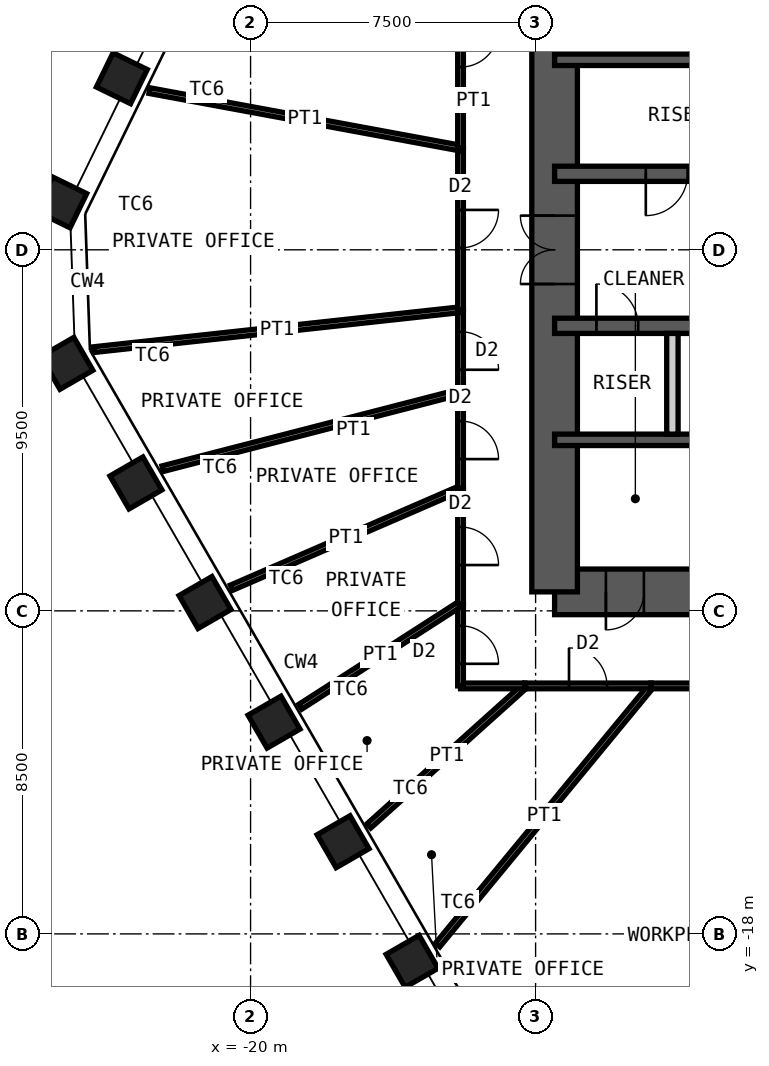
"""IFC4 building model, lengths in metres.
Left out: names, types, materials, properties, quantities, classifications, styles, units other than length and angle.
Written with IfcOpenShell. Run it as: python <this file> out.ifc"""

import sys

from ifc_helpers import new_model, si_unit, direction, frame, frame_2d, origin, origin_2d, place, context, subcontext, project, spatial, rectangle, hollow_rectangle, extrude, element, fill, save


model = new_model("IFC4")
c1 = context("Model", 3, precision=1e-05, world=origin(), true_north=direction((0.0, 1.0)))
c2 = subcontext(c1, "Body", "Model", "MODEL_VIEW")
j1 = project(units=[si_unit("LENGTHUNIT", "METRE"), si_unit("PLANEANGLEUNIT", "RADIAN")], contexts=[c1])
p1 = place(None, origin())
s1 = spatial("IfcSite", under=j1, at=p1, CompositionType="ELEMENT")
p2 = place(p1, origin())
s2 = spatial("IfcBuilding", under=s1, at=p2, CompositionType="ELEMENT")
p3 = place(p2, frame((0.0, 0.0, 243.4)))
s3 = spatial("IfcBuildingStorey", under=s2, at=p3, CompositionType="ELEMENT", Elevation=243.4)
for number, where, z_axis, x_axis in (
    (1, (-15.749, -18.721, 0.0), (0.0, 0.0, 1.0), (0.5, -0.866, 0.0)),
    (2, (-17.566, -15.574, 0.0), (0.0, 0.0, 1.0), (0.5, -0.866, 0.0)),
    (3, (-19.383, -12.428, 0.0), (0.0, 0.0, 1.0), (0.5, -0.866, 0.0)),
    (4, (-21.2, -9.281, 0.0), (0.0, 0.0, 1.0), (0.5, -0.866, 0.0)),
    (5, (-23.016, -6.134, 0.0), (0.0, 0.0, 1.0), (0.5, -0.866, 0.0)),
    (6, (-24.833, -2.988, 0.0), (0.0, 0.0, 1.0), (0.5, -0.866, 0.0)),
    (7, (-24.981, 1.248, 0.0), (0.0, 0.0, 1.0), (-0.438, -0.899, 0.0)),
    (8, (-23.388, 4.514, 0.0), (0.0, 0.0, 1.0), (-0.438, -0.899, 0.0)),
):
    element("IfcColumn", number, at=place(p3, frame(where, z_axis=z_axis, x_axis=x_axis)), inside=s3, PredefinedType="COLUMN", context=c2, shape_type="SweptSolid", body=[
        extrude(hollow_rectangle(XDim=1.0, YDim=1.0, WallThickness=0.06, at=origin_2d()), origin(), (0.0, 0.0, 1.0), 4.2),
    ])
p4 = place(p3, frame((-12.0, -9.0, 0.0), z_axis=(0.0, 0.0, 1.0), x_axis=(1.0, 0.0, 0.0)))
e9 = element("IfcWall", 9, at=p4, inside=s3, PredefinedType="SHEAR", context=c2, shape_type="SweptSolid", body=[
    extrude(rectangle(XDim=24.0, YDim=1.2, at=frame_2d((12.0, 0.0))), origin(), (0.0, 0.0, 1.0), 4.2),
])
p5 = place(p4, frame((1.35, 0.0, 0.0)))
e10 = element("IfcOpeningElement", 10, at=p5, cuts=e9, PredefinedType="OPENING", context=c2, shape_type="SweptSolid", body=[
    extrude(rectangle(XDim=1.0, YDim=2.1, at=frame_2d((0.5, 1.05))), frame((0.0, 0.61, 0.0), z_axis=(0.0, -1.0, 0.0), x_axis=(1.0, 0.0, 0.0)), (0.0, 0.0, 1.0), 1.22),
])
p6 = place(p4, frame((5.325, 0.0, 0.0)))
e11 = element("IfcOpeningElement", 11, at=p6, cuts=e9, PredefinedType="OPENING", context=c2, shape_type="SweptSolid", body=[
    extrude(rectangle(XDim=1.15, YDim=2.1, at=frame_2d((0.575, 1.05))), frame((0.0, 0.61, 0.0), z_axis=(0.0, -1.0, 0.0), x_axis=(1.0, 0.0, 0.0)), (0.0, 0.0, 1.0), 1.22),
])
p7 = place(p4, frame((12.6, 0.0, 0.0)))
e12 = element("IfcOpeningElement", 12, at=p7, cuts=e9, PredefinedType="OPENING", context=c2, shape_type="SweptSolid", body=[
    extrude(rectangle(XDim=1.0, YDim=2.1, at=frame_2d((0.5, 1.05))), frame((0.0, 0.61, 0.0), z_axis=(0.0, -1.0, 0.0), x_axis=(1.0, 0.0, 0.0)), (0.0, 0.0, 1.0), 1.22),
])
p8 = place(p3, frame((-12.0, -9.0, 0.0), z_axis=(0.0, 0.0, 1.0), x_axis=(0.0, 1.0, 0.0)))
e13 = element("IfcWall", 13, at=p8, inside=s3, PredefinedType="SHEAR", context=c2, shape_type="SweptSolid", body=[
    extrude(rectangle(XDim=18.0, YDim=1.2, at=frame_2d((9.0, 0.0))), origin(), (0.0, 0.0, 1.0), 4.2),
])
p9 = place(p8, frame((8.1, 0.0, 0.0)))
e14 = element("IfcOpeningElement", 14, at=p9, cuts=e13, PredefinedType="OPENING", context=c2, shape_type="SweptSolid", body=[
    extrude(rectangle(XDim=1.8, YDim=2.1, at=frame_2d((0.9, 1.05))), frame((0.0, 0.61, 0.0), z_axis=(0.0, -1.0, 0.0), x_axis=(1.0, 0.0, 0.0)), (0.0, 0.0, 1.0), 1.22),
])
p10 = place(p3, frame((-12.0, 5.0, 0.0), z_axis=(0.0, 0.0, 1.0), x_axis=(1.0, 0.0, 0.0)))
e15 = element("IfcWall", 15, at=p10, inside=s3, PredefinedType="SHEAR", context=c2, shape_type="SweptSolid", body=[
    extrude(rectangle(XDim=24.0, YDim=0.3, at=frame_2d((12.0, 0.0))), origin(), (0.0, 0.0, 1.0), 4.2),
])
p11 = place(p3, frame((-12.0, 2.0, 0.0), z_axis=(0.0, 0.0, 1.0), x_axis=(1.0, 0.0, 0.0)))
e16 = element("IfcWall", 16, at=p11, inside=s3, PredefinedType="SHEAR", context=c2, shape_type="SweptSolid", body=[
    extrude(rectangle(XDim=24.0, YDim=0.4, at=frame_2d((12.0, 0.0))), origin(), (0.0, 0.0, 1.0), 4.2),
])
p12 = place(p11, frame((2.4, 0.0, 0.0)))
e17 = element("IfcOpeningElement", 17, at=p12, cuts=e16, PredefinedType="OPENING", context=c2, shape_type="SweptSolid", body=[
    extrude(rectangle(XDim=1.1, YDim=2.1, at=frame_2d((0.55, 1.05))), frame((0.0, 0.21, 0.0), z_axis=(0.0, -1.0, 0.0), x_axis=(1.0, 0.0, 0.0)), (0.0, 0.0, 1.0), 0.42),
])
p13 = place(p11, frame((22.0, 0.0, 0.0)))
e18 = element("IfcOpeningElement", 18, at=p13, cuts=e16, PredefinedType="OPENING", context=c2, shape_type="SweptSolid", body=[
    extrude(rectangle(XDim=1.1, YDim=2.1, at=frame_2d((0.55, 1.05))), frame((0.0, 0.21, 0.0), z_axis=(0.0, -1.0, 0.0), x_axis=(1.0, 0.0, 0.0)), (0.0, 0.0, 1.0), 0.42),
])
p14 = place(p11, frame((10.15, 0.0, 0.0)))
e19 = element("IfcOpeningElement", 19, at=p14, cuts=e16, PredefinedType="OPENING", context=c2, shape_type="SweptSolid", body=[
    extrude(rectangle(XDim=1.0, YDim=2.1, at=frame_2d((0.5, 1.05))), frame((0.0, 0.21, 0.0), z_axis=(0.0, -1.0, 0.0), x_axis=(1.0, 0.0, 0.0)), (0.0, 0.0, 1.0), 0.42),
])
p15 = place(p11, frame((6.9, 0.0, 0.0)))
e20 = element("IfcOpeningElement", 20, at=p15, cuts=e16, PredefinedType="OPENING", context=c2, shape_type="SweptSolid", body=[
    extrude(rectangle(XDim=1.0, YDim=2.1, at=frame_2d((0.5, 1.05))), frame((0.0, 0.21, 0.0), z_axis=(0.0, -1.0, 0.0), x_axis=(1.0, 0.0, 0.0)), (0.0, 0.0, 1.0), 0.42),
])
p16 = place(p11, frame((13.35, 0.0, 0.0)))
e21 = element("IfcOpeningElement", 21, at=p16, cuts=e16, PredefinedType="OPENING", context=c2, shape_type="SweptSolid", body=[
    extrude(rectangle(XDim=1.1, YDim=2.4, at=frame_2d((0.55, 1.2))), frame((0.0, 0.21, 0.0), z_axis=(0.0, -1.0, 0.0), x_axis=(1.0, 0.0, 0.0)), (0.0, 0.0, 1.0), 0.42),
])
p17 = place(p11, frame((16.15, 0.0, 0.0)))
e22 = element("IfcOpeningElement", 22, at=p17, cuts=e16, PredefinedType="OPENING", context=c2, shape_type="SweptSolid", body=[
    extrude(rectangle(XDim=1.1, YDim=2.4, at=frame_2d((0.55, 1.2))), frame((0.0, 0.21, 0.0), z_axis=(0.0, -1.0, 0.0), x_axis=(1.0, 0.0, 0.0)), (0.0, 0.0, 1.0), 0.42),
])
p18 = place(p11, frame((18.95, 0.0, 0.0)))
e23 = element("IfcOpeningElement", 23, at=p18, cuts=e16, PredefinedType="OPENING", context=c2, shape_type="SweptSolid", body=[
    extrude(rectangle(XDim=1.1, YDim=2.4, at=frame_2d((0.55, 1.2))), frame((0.0, 0.21, 0.0), z_axis=(0.0, -1.0, 0.0), x_axis=(1.0, 0.0, 0.0)), (0.0, 0.0, 1.0), 0.42),
])
p19 = place(p3, frame((-12.0, -2.0, 0.0), z_axis=(0.0, 0.0, 1.0), x_axis=(1.0, 0.0, 0.0)))
e24 = element("IfcWall", 24, at=p19, inside=s3, PredefinedType="SHEAR", context=c2, shape_type="SweptSolid", body=[
    extrude(rectangle(XDim=24.0, YDim=0.4, at=frame_2d((12.0, 0.0))), origin(), (0.0, 0.0, 1.0), 4.2),
])
p20 = place(p19, frame((1.1, 0.0, 0.0)))
e25 = element("IfcOpeningElement", 25, at=p20, cuts=e24, PredefinedType="OPENING", context=c2, shape_type="SweptSolid", body=[
    extrude(rectangle(XDim=1.1, YDim=2.1, at=frame_2d((0.55, 1.05))), frame((0.0, 0.21, 0.0), z_axis=(0.0, -1.0, 0.0), x_axis=(1.0, 0.0, 0.0)), (0.0, 0.0, 1.0), 0.42),
])
p21 = place(p19, frame((13.55, 0.0, 0.0)))
e26 = element("IfcOpeningElement", 26, at=p21, cuts=e24, PredefinedType="OPENING", context=c2, shape_type="SweptSolid", body=[
    extrude(rectangle(XDim=1.1, YDim=2.1, at=frame_2d((0.55, 1.05))), frame((0.0, 0.21, 0.0), z_axis=(0.0, -1.0, 0.0), x_axis=(1.0, 0.0, 0.0)), (0.0, 0.0, 1.0), 0.42),
])
p22 = place(p19, frame((20.7, 0.0, 0.0)))
e27 = element("IfcOpeningElement", 27, at=p22, cuts=e24, PredefinedType="OPENING", context=c2, shape_type="SweptSolid", body=[
    extrude(rectangle(XDim=1.1, YDim=2.1, at=frame_2d((0.55, 1.05))), frame((0.0, 0.21, 0.0), z_axis=(0.0, -1.0, 0.0), x_axis=(1.0, 0.0, 0.0)), (0.0, 0.0, 1.0), 0.42),
])
p23 = place(p19, frame((4.0, 0.0, 0.0)))
e28 = element("IfcOpeningElement", 28, at=p23, cuts=e24, PredefinedType="OPENING", context=c2, shape_type="SweptSolid", body=[
    extrude(rectangle(XDim=1.0, YDim=2.1, at=frame_2d((0.5, 1.05))), frame((0.0, 0.21, 0.0), z_axis=(0.0, -1.0, 0.0), x_axis=(1.0, 0.0, 0.0)), (0.0, 0.0, 1.0), 0.42),
])
p24 = place(p19, frame((6.8, 0.0, 0.0)))
e29 = element("IfcOpeningElement", 29, at=p24, cuts=e24, PredefinedType="OPENING", context=c2, shape_type="SweptSolid", body=[
    extrude(rectangle(XDim=1.0, YDim=2.1, at=frame_2d((0.5, 1.05))), frame((0.0, 0.21, 0.0), z_axis=(0.0, -1.0, 0.0), x_axis=(1.0, 0.0, 0.0)), (0.0, 0.0, 1.0), 0.42),
])
p25 = place(p3, frame((-12.0, -5.0, 0.0), z_axis=(0.0, 0.0, 1.0), x_axis=(1.0, 0.0, 0.0)))
e30 = element("IfcWall", 30, at=p25, inside=s3, PredefinedType="SHEAR", context=c2, shape_type="SweptSolid", body=[
    extrude(rectangle(XDim=24.0, YDim=0.3, at=frame_2d((12.0, 0.0))), origin(), (0.0, 0.0, 1.0), 4.2),
])
p26 = place(p3, frame((-8.9, -4.85, 0.0), z_axis=(0.0, 0.0, 1.0), x_axis=(0.0, 1.0, 0.0)))
e31 = element("IfcWall", 31, at=p26, inside=s3, PredefinedType="PARTITIONING", context=c2, shape_type="SweptSolid", body=[
    extrude(rectangle(XDim=2.65, YDim=0.3, at=frame_2d((1.325, 0.0))), origin(), (0.0, 0.0, 1.0), 3.98),
])
p27 = place(p3, frame((-15.08, -18.294, 0.0), z_axis=(0.0, 0.0, 1.0), x_axis=(0.636052894953, 0.771645459277, 0.0)))
e32 = element("IfcWall", 32, at=p27, inside=s3, PredefinedType="PARTITIONING", context=c2, shape_type="SweptSolid", body=[
    extrude(rectangle(XDim=8.837, YDim=0.15, at=frame_2d((4.418, 0.0))), origin(), (0.0, 0.0, 1.0), 3.43),
])
p28 = place(p3, frame((-9.459, -11.475, 0.0), z_axis=(0.0, 0.0, 1.0), x_axis=(-1.0, 0.0, 0.0)))
e33 = element("IfcWall", 33, at=p28, inside=s3, PredefinedType="PARTITIONING", context=c2, shape_type="SweptSolid", body=[
    extrude(rectangle(XDim=3.324, YDim=0.15, at=frame_2d((1.662, 0.0))), origin(), (0.0, 0.0, 1.0), 4.03),
])
p29 = place(p28, frame((1.162, 0.0, 0.0)))
e34 = element("IfcOpeningElement", 34, at=p29, cuts=e33, PredefinedType="OPENING", context=c2, shape_type="SweptSolid", body=[
    extrude(rectangle(XDim=1.0, YDim=2.4, at=frame_2d((0.5, 1.2))), frame((0.0, 0.085, 0.0), z_axis=(0.0, -1.0, 0.0), x_axis=(1.0, 0.0, 0.0)), (0.0, 0.0, 1.0), 0.17),
])
p30 = place(p3, frame((-16.885, -15.158, 0.0), z_axis=(0.0, 0.0, 1.0), x_axis=(0.744165513773, 0.667995275515, 0.0)))
e35 = element("IfcWall", 35, at=p30, inside=s3, PredefinedType="PARTITIONING", context=c2, shape_type="SweptSolid", body=[
    extrude(rectangle(XDim=5.513, YDim=0.15, at=frame_2d((2.756, 0.0))), origin(), (0.0, 0.0, 1.0), 3.43),
])
p31 = place(p3, frame((-12.783, -11.475, 0.0), z_axis=(0.0, 0.0, 1.0), x_axis=(-1.0, 0.0, 0.0)))
e36 = element("IfcWall", 36, at=p31, inside=s3, PredefinedType="PARTITIONING", context=c2, shape_type="SweptSolid", body=[
    extrude(rectangle(XDim=1.692, YDim=0.15, at=frame_2d((0.846, 0.0))), origin(), (0.0, 0.0, 1.0), 4.03),
])
p32 = place(p3, frame((-14.475, -11.475, 0.0), z_axis=(0.0, 0.0, 1.0), x_axis=(0.0, 1.0, 0.0)))
e37 = element("IfcWall", 37, at=p32, inside=s3, PredefinedType="PARTITIONING", context=c2, shape_type="SweptSolid", body=[
    extrude(rectangle(XDim=2.164, YDim=0.15, at=frame_2d((1.082, 0.0))), origin(), (0.0, 0.0, 1.0), 4.03),
])
p33 = place(p32, frame((0.582, 0.0, 0.0)))
e38 = element("IfcOpeningElement", 38, at=p33, cuts=e37, PredefinedType="OPENING", context=c2, shape_type="SweptSolid", body=[
    extrude(rectangle(XDim=1.0, YDim=2.4, at=frame_2d((0.5, 1.2))), frame((0.0, 0.085, 0.0), z_axis=(0.0, -1.0, 0.0), x_axis=(1.0, 0.0, 0.0)), (0.0, 0.0, 1.0), 0.17),
])
p34 = place(p3, frame((-18.693, -12.024, 0.0), z_axis=(0.0, 0.0, 1.0), x_axis=(0.841031335058, 0.540986407824, 0.0)))
e39 = element("IfcWall", 39, at=p34, inside=s3, PredefinedType="PARTITIONING", context=c2, shape_type="SweptSolid", body=[
    extrude(rectangle(XDim=5.015, YDim=0.15, at=frame_2d((2.507, 0.0))), origin(), (0.0, 0.0, 1.0), 3.43),
])
p35 = place(p3, frame((-14.475, -9.311, 0.0), z_axis=(0.0, 0.0, 1.0), x_axis=(0.0, 1.0, 0.0)))
e40 = element("IfcWall", 40, at=p35, inside=s3, PredefinedType="PARTITIONING", context=c2, shape_type="SweptSolid", body=[
    extrude(rectangle(XDim=3.033, YDim=0.15, at=frame_2d((1.517, 0.0))), origin(), (0.0, 0.0, 1.0), 4.03),
])
p36 = place(p35, frame((1.017, 0.0, 0.0)))
e41 = element("IfcOpeningElement", 41, at=p36, cuts=e40, PredefinedType="OPENING", context=c2, shape_type="SweptSolid", body=[
    extrude(rectangle(XDim=1.0, YDim=2.4, at=frame_2d((0.5, 1.2))), frame((0.0, 0.085, 0.0), z_axis=(0.0, -1.0, 0.0), x_axis=(1.0, 0.0, 0.0)), (0.0, 0.0, 1.0), 0.17),
])
p37 = place(p3, frame((-20.502, -8.891, 0.0), z_axis=(0.0, 0.0, 1.0), x_axis=(0.917431289744, 0.397894242982, 0.0)))
e42 = element("IfcWall", 42, at=p37, inside=s3, PredefinedType="PARTITIONING", context=c2, shape_type="SweptSolid", body=[
    extrude(rectangle(XDim=6.569, YDim=0.15, at=frame_2d((3.285, 0.0))), origin(), (0.0, 0.0, 1.0), 3.43),
])
p38 = place(p3, frame((-14.475, -6.278, 0.0), z_axis=(0.0, 0.0, 1.0), x_axis=(0.0, 1.0, 0.0)))
e43 = element("IfcWall", 43, at=p38, inside=s3, PredefinedType="PARTITIONING", context=c2, shape_type="SweptSolid", body=[
    extrude(rectangle(XDim=2.542, YDim=0.15, at=frame_2d((1.271, 0.0))), origin(), (0.0, 0.0, 1.0), 4.03),
])
p39 = place(p38, frame((0.771, 0.0, 0.0)))
e44 = element("IfcOpeningElement", 44, at=p39, cuts=e43, PredefinedType="OPENING", context=c2, shape_type="SweptSolid", body=[
    extrude(rectangle(XDim=1.0, YDim=2.4, at=frame_2d((0.5, 1.2))), frame((0.0, 0.085, 0.0), z_axis=(0.0, -1.0, 0.0), x_axis=(1.0, 0.0, 0.0)), (0.0, 0.0, 1.0), 0.17),
])
p40 = place(p3, frame((-22.313, -5.759, 0.0), z_axis=(0.0, 0.0, 1.0), x_axis=(0.968265788926, 0.249922712042, 0.0)))
e45 = element("IfcWall", 45, at=p40, inside=s3, PredefinedType="PARTITIONING", context=c2, shape_type="SweptSolid", body=[
    extrude(rectangle(XDim=8.095, YDim=0.15, at=frame_2d((4.048, 0.0))), origin(), (0.0, 0.0, 1.0), 3.43),
])
p41 = place(p3, frame((-14.475, -3.736, 0.0), z_axis=(0.0, 0.0, 1.0), x_axis=(0.0, 1.0, 0.0)))
e46 = element("IfcWall", 46, at=p41, inside=s3, PredefinedType="PARTITIONING", context=c2, shape_type="SweptSolid", body=[
    extrude(rectangle(XDim=2.16, YDim=0.15, at=frame_2d((1.08, 0.0))), origin(), (0.0, 0.0, 1.0), 4.03),
])
p42 = place(p41, frame((0.58, 0.0, 0.0)))
e47 = element("IfcOpeningElement", 47, at=p42, cuts=e46, PredefinedType="OPENING", context=c2, shape_type="SweptSolid", body=[
    extrude(rectangle(XDim=1.0, YDim=2.4, at=frame_2d((0.5, 1.2))), frame((0.0, 0.085, 0.0), z_axis=(0.0, -1.0, 0.0), x_axis=(1.0, 0.0, 0.0)), (0.0, 0.0, 1.0), 0.17),
])
p43 = place(p3, frame((-24.128, -2.627, 0.0), z_axis=(0.0, 0.0, 1.0), x_axis=(0.994126892449, 0.108220708326, 0.0)))
e48 = element("IfcWall", 48, at=p43, inside=s3, PredefinedType="PARTITIONING", context=c2, shape_type="SweptSolid", body=[
    extrude(rectangle(XDim=9.71, YDim=0.15, at=frame_2d((4.855, 0.0))), origin(), (0.0, 0.0, 1.0), 2.93),
])
p44 = place(p3, frame((-14.475, -1.576, 0.0), z_axis=(0.0, 0.0, 1.0), x_axis=(0.0, 1.0, 0.0)))
e49 = element("IfcWall", 49, at=p44, inside=s3, PredefinedType="PARTITIONING", context=c2, shape_type="SweptSolid", body=[
    extrude(rectangle(XDim=4.252, YDim=0.15, at=frame_2d((2.126, 0.0))), origin(), (0.0, 0.0, 1.0), 4.03),
])
p45 = place(p44, frame((1.626, 0.0, 0.0)))
e50 = element("IfcOpeningElement", 50, at=p45, cuts=e49, PredefinedType="OPENING", context=c2, shape_type="SweptSolid", body=[
    extrude(rectangle(XDim=1.0, YDim=2.4, at=frame_2d((0.5, 1.2))), frame((0.0, 0.085, 0.0), z_axis=(0.0, -1.0, 0.0), x_axis=(1.0, 0.0, 0.0)), (0.0, 0.0, 1.0), 0.17),
])
p46 = place(p3, frame((-22.661, 4.189, 0.0), z_axis=(0.0, 0.0, 1.0), x_axis=(0.983345347199, -0.181746879316, 0.0)))
e51 = element("IfcWall", 51, at=p46, inside=s3, PredefinedType="PARTITIONING", context=c2, shape_type="SweptSolid", body=[
    extrude(rectangle(XDim=8.324, YDim=0.15, at=frame_2d((4.162, 0.0))), origin(), (0.0, 0.0, 1.0), 3.43),
])
p47 = place(p3, frame((-14.475, 2.676, 0.0), z_axis=(0.0, 0.0, 1.0), x_axis=(0.0, 1.0, 0.0)))
e52 = element("IfcWall", 52, at=p47, inside=s3, PredefinedType="PARTITIONING", context=c2, shape_type="SweptSolid", body=[
    extrude(rectangle(XDim=5.266, YDim=0.15, at=frame_2d((2.633, 0.0))), origin(), (0.0, 0.0, 1.0), 4.03),
])
p48 = place(p47, frame((2.133, 0.0, 0.0)))
e53 = element("IfcOpeningElement", 53, at=p48, cuts=e52, PredefinedType="OPENING", context=c2, shape_type="SweptSolid", body=[
    extrude(rectangle(XDim=1.0, YDim=2.4, at=frame_2d((0.5, 1.2))), frame((0.0, 0.085, 0.0), z_axis=(0.0, -1.0, 0.0), x_axis=(1.0, 0.0, 0.0)), (0.0, 0.0, 1.0), 0.17),
])
p49 = place(p3, frame((-1.595, -11.475, 0.0), z_axis=(0.0, 0.0, 1.0), x_axis=(-1.0, 0.0, 0.0)))
e54 = element("IfcWall", 54, at=p49, inside=s3, PredefinedType="PARTITIONING", context=c2, shape_type="SweptSolid", body=[
    extrude(rectangle(XDim=7.864, YDim=0.15, at=frame_2d((3.932, 0.0))), origin(), (0.0, 0.0, 1.0), 4.03),
])
p50 = place(p49, frame((3.032, 0.0, 0.0)))
e55 = element("IfcOpeningElement", 55, at=p50, cuts=e54, PredefinedType="OPENING", context=c2, shape_type="SweptSolid", body=[
    extrude(rectangle(XDim=1.8, YDim=2.4, at=frame_2d((0.9, 1.2))), frame((0.0, 0.085, 0.0), z_axis=(0.0, -1.0, 0.0), x_axis=(1.0, 0.0, 0.0)), (0.0, 0.0, 1.0), 0.17),
])
p51 = place(p5, origin())
e56 = element("IfcDoor", 56, at=p51, inside=s3, OperationType="SINGLE_SWING_LEFT", PredefinedType="DOOR", context=c2, shape_type="SweptSolid", body=[
    extrude(rectangle(XDim=1.0, YDim=2.1, at=frame_2d((0.5, 1.05))), frame((0.0, 0.025, 0.0), z_axis=(0.0, -1.0, 0.0), x_axis=(1.0, 0.0, 0.0)), (0.0, 0.0, 1.0), 0.05),
])
fill(e10, e56)
p52 = place(p12, origin())
e57 = element("IfcDoor", 57, at=p52, inside=s3, OperationType="SINGLE_SWING_LEFT", PredefinedType="DOOR", context=c2, shape_type="SweptSolid", body=[
    extrude(rectangle(XDim=1.1, YDim=2.1, at=frame_2d((0.55, 1.05))), frame((0.0, 0.025, 0.0), z_axis=(0.0, -1.0, 0.0), x_axis=(1.0, 0.0, 0.0)), (0.0, 0.0, 1.0), 0.05),
])
fill(e17, e57)
p53 = place(p20, origin())
e58 = element("IfcDoor", 58, at=p53, inside=s3, OperationType="SINGLE_SWING_RIGHT", PredefinedType="DOOR", context=c2, shape_type="SweptSolid", body=[
    extrude(rectangle(XDim=1.1, YDim=2.1, at=frame_2d((0.55, 1.05))), frame((0.0, 0.025, 0.0), z_axis=(0.0, -1.0, 0.0), x_axis=(1.0, 0.0, 0.0)), (0.0, 0.0, 1.0), 0.05),
])
fill(e25, e58)
p54 = place(p9, origin())
e59 = element("IfcDoor", 59, at=p54, inside=s3, OperationType="DOUBLE_DOOR_DOUBLE_SWING", PredefinedType="DOOR", context=c2, shape_type="SweptSolid", body=[
    extrude(rectangle(XDim=1.8, YDim=2.1, at=frame_2d((0.9, 1.05))), frame((0.0, 0.025, 0.0), z_axis=(0.0, -1.0, 0.0), x_axis=(1.0, 0.0, 0.0)), (0.0, 0.0, 1.0), 0.05),
])
fill(e14, e59)
p55 = place(p29, origin())
e60 = element("IfcDoor", 60, at=p55, inside=s3, OperationType="SINGLE_SWING_RIGHT", PredefinedType="DOOR", context=c2, shape_type="SweptSolid", body=[
    extrude(rectangle(XDim=1.0, YDim=2.4, at=frame_2d((0.5, 1.2))), frame((0.0, 0.025, 0.0), z_axis=(0.0, -1.0, 0.0), x_axis=(1.0, 0.0, 0.0)), (0.0, 0.0, 1.0), 0.05),
])
fill(e34, e60)
p56 = place(p33, origin())
e61 = element("IfcDoor", 61, at=p56, inside=s3, OperationType="SINGLE_SWING_LEFT", PredefinedType="DOOR", context=c2, shape_type="SweptSolid", body=[
    extrude(rectangle(XDim=1.0, YDim=2.4, at=frame_2d((0.5, 1.2))), frame((0.0, 0.025, 0.0), z_axis=(0.0, -1.0, 0.0), x_axis=(1.0, 0.0, 0.0)), (0.0, 0.0, 1.0), 0.05),
])
fill(e38, e61)
p57 = place(p36, origin())
e62 = element("IfcDoor", 62, at=p57, inside=s3, OperationType="SINGLE_SWING_LEFT", PredefinedType="DOOR", context=c2, shape_type="SweptSolid", body=[
    extrude(rectangle(XDim=1.0, YDim=2.4, at=frame_2d((0.5, 1.2))), frame((0.0, 0.025, 0.0), z_axis=(0.0, -1.0, 0.0), x_axis=(1.0, 0.0, 0.0)), (0.0, 0.0, 1.0), 0.05),
])
fill(e41, e62)
p58 = place(p39, origin())
e63 = element("IfcDoor", 63, at=p58, inside=s3, OperationType="SINGLE_SWING_LEFT", PredefinedType="DOOR", context=c2, shape_type="SweptSolid", body=[
    extrude(rectangle(XDim=1.0, YDim=2.4, at=frame_2d((0.5, 1.2))), frame((0.0, 0.025, 0.0), z_axis=(0.0, -1.0, 0.0), x_axis=(1.0, 0.0, 0.0)), (0.0, 0.0, 1.0), 0.05),
])
fill(e44, e63)
p59 = place(p42, origin())
e64 = element("IfcDoor", 64, at=p59, inside=s3, OperationType="SINGLE_SWING_LEFT", PredefinedType="DOOR", context=c2, shape_type="SweptSolid", body=[
    extrude(rectangle(XDim=1.0, YDim=2.4, at=frame_2d((0.5, 1.2))), frame((0.0, 0.025, 0.0), z_axis=(0.0, -1.0, 0.0), x_axis=(1.0, 0.0, 0.0)), (0.0, 0.0, 1.0), 0.05),
])
fill(e47, e64)
p60 = place(p45, origin())
e65 = element("IfcDoor", 65, at=p60, inside=s3, OperationType="SINGLE_SWING_RIGHT", PredefinedType="DOOR", context=c2, shape_type="SweptSolid", body=[
    extrude(rectangle(XDim=1.0, YDim=2.4, at=frame_2d((0.5, 1.2))), frame((0.0, 0.025, 0.0), z_axis=(0.0, -1.0, 0.0), x_axis=(1.0, 0.0, 0.0)), (0.0, 0.0, 1.0), 0.05),
])
fill(e50, e65)
p61 = place(p48, origin())
e66 = element("IfcDoor", 66, at=p61, inside=s3, OperationType="SINGLE_SWING_RIGHT", PredefinedType="DOOR", context=c2, shape_type="SweptSolid", body=[
    extrude(rectangle(XDim=1.0, YDim=2.4, at=frame_2d((0.5, 1.2))), frame((0.0, 0.025, 0.0), z_axis=(0.0, -1.0, 0.0), x_axis=(1.0, 0.0, 0.0)), (0.0, 0.0, 1.0), 0.05),
])
fill(e53, e66)
save(model, sys.argv[1])
